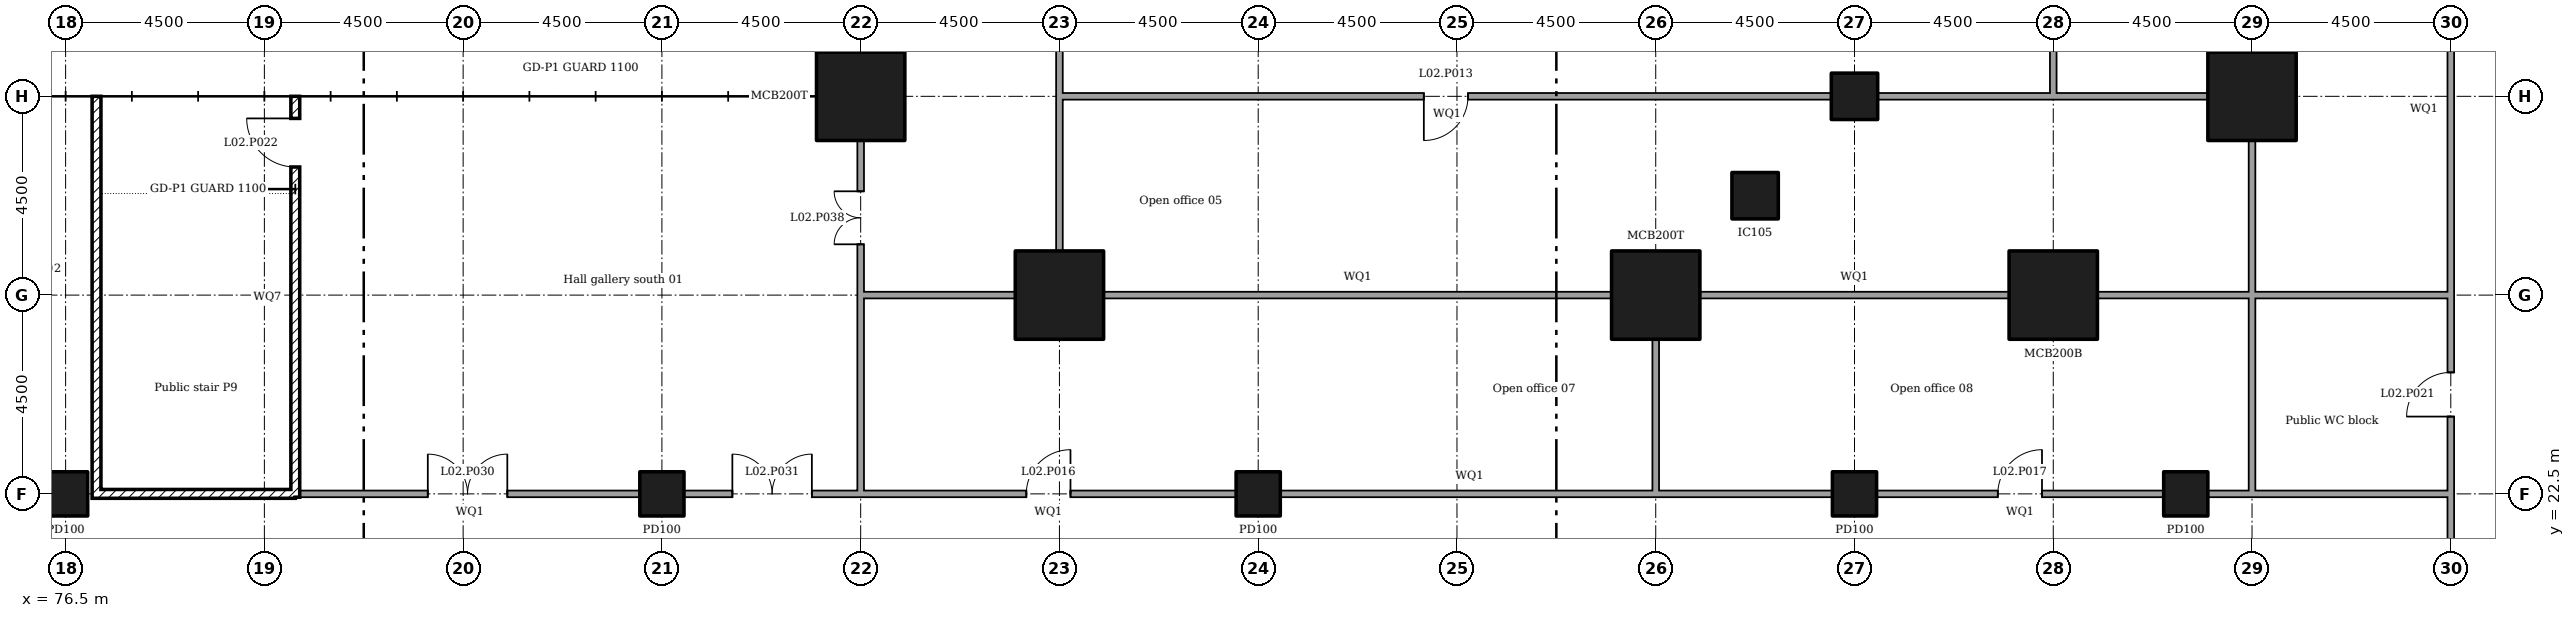
"""IFC4 building model, lengths in metres.
Left out: names, types, materials, properties, quantities, classifications, styles, units other than length and angle.
Written with IfcOpenShell. Run it as: python <this file> out.ifc"""

import sys

from ifc_helpers import new_model, si_unit, direction, frame, frame_2d, origin, origin_2d, place, context, subcontext, project, spatial, rectangle, extrude, element, fill, save


model = new_model("IFC4")
c1 = context("Model", 3, precision=1e-05, world=origin(), true_north=direction((0.0, 1.0)))
c2 = subcontext(c1, "Body", "Model", "MODEL_VIEW")
j1 = project(units=[si_unit("LENGTHUNIT", "METRE"), si_unit("PLANEANGLEUNIT", "RADIAN")], contexts=[c1])
p1 = place(None, origin())
s1 = spatial("IfcSite", under=j1, at=p1, CompositionType="ELEMENT")
p2 = place(p1, origin())
s2 = spatial("IfcBuilding", under=s1, at=p2, CompositionType="ELEMENT")
p3 = place(p2, frame((0.0, 0.0, 11.5)))
s3 = spatial("IfcBuildingStorey", under=s2, at=p3, CompositionType="ELEMENT", Elevation=11.5)
for number, where in (
    (1, (94.5, 31.5, 0.0)),
    (2, (99.0, 27.0, 0.0)),
    (3, (112.5, 27.0, 0.0)),
    (4, (121.5, 27.0, 0.0)),
    (5, (126.0, 31.5, 0.0)),
):
    element("IfcColumn", number, at=place(p3, frame(where)), inside=s3, PredefinedType="COLUMN", context=c2, shape_type="SweptSolid", body=[
        extrude(rectangle(XDim=2.0, YDim=2.0, at=origin_2d()), origin(), (0.0, 0.0, 1.0), 5.0),
    ])
for number, where in (
    (6, (114.75, 29.25, 0.0)),
    (7, (117.0, 31.5, 0.0)),
):
    element("IfcColumn", number, at=place(p3, frame(where)), inside=s3, PredefinedType="COLUMN", context=c2, shape_type="SweptSolid", body=[
        extrude(rectangle(XDim=1.05, YDim=1.05, at=origin_2d()), origin(), (0.0, 0.0, 1.0), 5.0),
    ])
for number, where in (
    (8, (76.5, 22.5, 0.0)),
    (9, (90.0, 22.5, 0.0)),
    (10, (103.5, 22.5, 0.0)),
    (11, (117.0, 22.5, 0.0)),
    (12, (124.5, 22.5, 0.0)),
):
    element("IfcColumn", number, at=place(p3, frame(where)), inside=s3, PredefinedType="COLUMN", context=c2, shape_type="SweptSolid", body=[
        extrude(rectangle(XDim=1.0, YDim=1.0, at=origin_2d()), origin(), (0.0, 0.0, 1.0), 5.0),
    ])
p4 = place(p2, frame((0.0, 0.0, 6.0)))
s4 = spatial("IfcBuildingStorey", under=s2, at=p4, CompositionType="ELEMENT", Elevation=6.0)
p5 = place(p4, frame((94.5, 32.495, 0.0), z_axis=(0.0, 0.0, 1.0), x_axis=(0.0, 1.0, 0.0)))
e13 = element("IfcWall", 13, at=p5, inside=s4, PredefinedType="SOLIDWALL", context=c2, shape_type="SweptSolid", body=[
    extrude(rectangle(XDim=11.51, YDim=0.3, at=frame_2d((5.755, 0.0))), origin(), (0.0, 0.0, 1.0), 10.05),
])
p6 = place(p5, frame((4.85, 0.0, 0.0)))
e14 = element("IfcOpeningElement", 14, at=p6, cuts=e13, PredefinedType="OPENING", context=c2, shape_type="SweptSolid", body=[
    extrude(rectangle(XDim=1.8, YDim=2.1, at=frame_2d((0.9, 1.05))), frame((0.0, 0.16, 0.0), z_axis=(0.0, -1.0, 0.0), x_axis=(1.0, 0.0, 0.0)), (0.0, 0.0, 1.0), 0.32),
])
p7 = place(p3, frame((130.5, 18.3, 0.0), z_axis=(0.0, 0.0, 1.0), x_axis=(0.0, 1.0, 0.0)))
e15 = element("IfcWall", 15, at=p7, inside=s3, PredefinedType="PARTITIONING", context=c2, shape_type="SweptSolid", body=[
    extrude(rectangle(XDim=4.275, YDim=0.15, at=frame_2d((2.137, 0.0))), origin(), (0.0, 0.0, 1.0), 4.55),
])
p8 = place(p7, frame((1.2, 0.0, 0.0)))
e16 = element("IfcOpeningElement", 16, at=p8, cuts=e15, PredefinedType="OPENING", context=c2, shape_type="SweptSolid", body=[
    extrude(rectangle(XDim=1.8, YDim=2.1, at=frame_2d((0.9, 1.05))), frame((0.0, 0.085, 0.0), z_axis=(0.0, -1.0, 0.0), x_axis=(1.0, 0.0, 0.0)), (0.0, 0.0, 1.0), 0.17),
])
p9 = place(p3, frame((130.5, 26.925, 0.0), z_axis=(0.0, 0.0, 1.0), x_axis=(0.0, 1.0, 0.0)))
e17 = element("IfcWall", 17, at=p9, inside=s3, PredefinedType="PARTITIONING", context=c2, shape_type="SweptSolid", body=[
    extrude(rectangle(XDim=8.58, YDim=0.15, at=frame_2d((4.29, 0.0))), origin(), (0.0, 0.0, 1.0), 4.55),
])
p10 = place(p3, frame((130.5, 22.5, 0.0), z_axis=(0.0, 0.0, 1.0), x_axis=(0.0, 1.0, 0.0)))
e18 = element("IfcWall", 18, at=p10, inside=s3, PredefinedType="PARTITIONING", context=c2, shape_type="SweptSolid", body=[
    extrude(rectangle(XDim=4.5, YDim=0.15, at=frame_2d((2.25, 0.0))), origin(), (0.0, 0.0, 1.0), 4.55),
])
p11 = place(p10, frame((1.75, 0.0, 0.0)))
e19 = element("IfcOpeningElement", 19, at=p11, cuts=e18, PredefinedType="OPENING", context=c2, shape_type="SweptSolid", body=[
    extrude(rectangle(XDim=1.0, YDim=2.1, at=frame_2d((0.5, 1.05))), frame((0.0, 0.085, 0.0), z_axis=(0.0, -1.0, 0.0), x_axis=(1.0, 0.0, 0.0)), (0.0, 0.0, 1.0), 0.17),
])
p12 = place(p3, frame((81.8, 22.5, 0.0)))
e20 = element("IfcWall", 20, at=p12, inside=s3, PredefinedType="PARTITIONING", context=c2, shape_type="SweptSolid", body=[
    extrude(rectangle(XDim=7.705, YDim=0.15, at=frame_2d((3.853, 0.0))), origin(), (0.0, 0.0, 1.0), 4.55),
])
p13 = place(p12, frame((2.9, 0.0, 0.0)))
e21 = element("IfcOpeningElement", 21, at=p13, cuts=e20, PredefinedType="OPENING", context=c2, shape_type="SweptSolid", body=[
    extrude(rectangle(XDim=1.8, YDim=2.1, at=frame_2d((0.9, 1.05))), frame((0.0, 0.085, 0.0), z_axis=(0.0, -1.0, 0.0), x_axis=(1.0, 0.0, 0.0)), (0.0, 0.0, 1.0), 0.17),
])
p14 = place(p3, frame((90.495, 22.5, 0.0)))
e22 = element("IfcWall", 22, at=p14, inside=s3, PredefinedType="PARTITIONING", context=c2, shape_type="SweptSolid", body=[
    extrude(rectangle(XDim=4.08, YDim=0.15, at=frame_2d((2.04, 0.0))), origin(), (0.0, 0.0, 1.0), 4.55),
])
p15 = place(p14, frame((1.1, 0.0, 0.0)))
e23 = element("IfcOpeningElement", 23, at=p15, cuts=e22, PredefinedType="OPENING", context=c2, shape_type="SweptSolid", body=[
    extrude(rectangle(XDim=1.8, YDim=2.1, at=frame_2d((0.9, 1.05))), frame((0.0, 0.085, 0.0), z_axis=(0.0, -1.0, 0.0), x_axis=(1.0, 0.0, 0.0)), (0.0, 0.0, 1.0), 0.17),
])
p16 = place(p3, frame((94.5, 22.5, 0.0)))
e24 = element("IfcWall", 24, at=p16, inside=s3, PredefinedType="PARTITIONING", context=c2, shape_type="SweptSolid", body=[
    extrude(rectangle(XDim=8.505, YDim=0.15, at=frame_2d((4.252, 0.0))), origin(), (0.0, 0.0, 1.0), 4.55),
])
p17 = place(p16, frame((3.75, 0.0, 0.0)))
e25 = element("IfcOpeningElement", 25, at=p17, cuts=e24, PredefinedType="OPENING", context=c2, shape_type="SweptSolid", body=[
    extrude(rectangle(XDim=1.0, YDim=2.1, at=frame_2d((0.5, 1.05))), frame((0.0, 0.085, 0.0), z_axis=(0.0, -1.0, 0.0), x_axis=(1.0, 0.0, 0.0)), (0.0, 0.0, 1.0), 0.17),
])
p18 = place(p3, frame((103.995, 22.5, 0.0)))
e26 = element("IfcWall", 26, at=p18, inside=s3, PredefinedType="PARTITIONING", context=c2, shape_type="SweptSolid", body=[
    extrude(rectangle(XDim=8.58, YDim=0.15, at=frame_2d((4.29, 0.0))), origin(), (0.0, 0.0, 1.0), 4.55),
])
p19 = place(p3, frame((112.5, 22.5, 0.0)))
e27 = element("IfcWall", 27, at=p19, inside=s3, PredefinedType="PARTITIONING", context=c2, shape_type="SweptSolid", body=[
    extrude(rectangle(XDim=4.005, YDim=0.15, at=frame_2d((2.002, 0.0))), origin(), (0.0, 0.0, 1.0), 4.55),
])
p20 = place(p3, frame((117.495, 22.5, 0.0)))
e28 = element("IfcWall", 28, at=p20, inside=s3, PredefinedType="PARTITIONING", context=c2, shape_type="SweptSolid", body=[
    extrude(rectangle(XDim=6.51, YDim=0.15, at=frame_2d((3.255, 0.0))), origin(), (0.0, 0.0, 1.0), 4.55),
])
p21 = place(p20, frame((2.75, 0.0, 0.0)))
e29 = element("IfcOpeningElement", 29, at=p21, cuts=e28, PredefinedType="OPENING", context=c2, shape_type="SweptSolid", body=[
    extrude(rectangle(XDim=1.0, YDim=2.1, at=frame_2d((0.5, 1.05))), frame((0.0, 0.085, 0.0), z_axis=(0.0, -1.0, 0.0), x_axis=(1.0, 0.0, 0.0)), (0.0, 0.0, 1.0), 0.17),
])
p22 = place(p3, frame((124.995, 22.5, 0.0)))
e30 = element("IfcWall", 30, at=p22, inside=s3, PredefinedType="PARTITIONING", context=c2, shape_type="SweptSolid", body=[
    extrude(rectangle(XDim=1.08, YDim=0.15, at=frame_2d((0.54, 0.0))), origin(), (0.0, 0.0, 1.0), 4.55),
])
p23 = place(p3, frame((126.0, 22.5, 0.0)))
e31 = element("IfcWall", 31, at=p23, inside=s3, PredefinedType="PARTITIONING", context=c2, shape_type="SweptSolid", body=[
    extrude(rectangle(XDim=4.425, YDim=0.15, at=frame_2d((2.212, 0.0))), origin(), (0.0, 0.0, 1.0), 4.55),
])
p24 = place(p3, frame((77.1, 22.5, 0.0)))
e32 = element("IfcWall", 32, at=p24, inside=s3, PredefinedType="SOLIDWALL", context=c2, shape_type="SweptSolid", body=[
    extrude(rectangle(XDim=4.6, YDim=0.2, at=frame_2d((2.3, 0.0))), origin(), (0.0, 0.0, 1.0), 4.55),
])
p25 = place(p3, frame((94.5, 26.925, 0.0), z_axis=(0.0, 0.0, 1.0), x_axis=(0.0, 1.0, 0.0)))
e33 = element("IfcWall", 33, at=p25, inside=s3, PredefinedType="PARTITIONING", context=c2, shape_type="SweptSolid", body=[
    extrude(rectangle(XDim=3.58, YDim=0.15, at=frame_2d((1.79, 0.0))), origin(), (0.0, 0.0, 1.0), 4.55),
])
p26 = place(p25, frame((1.225, 0.0, 0.0)))
e34 = element("IfcOpeningElement", 34, at=p26, cuts=e33, PredefinedType="OPENING", context=c2, shape_type="SweptSolid", body=[
    extrude(rectangle(XDim=1.2, YDim=2.1, at=frame_2d((0.6, 1.05))), frame((0.0, 0.085, 0.0), z_axis=(0.0, -1.0, 0.0), x_axis=(1.0, 0.0, 0.0)), (0.0, 0.0, 1.0), 0.17),
])
p27 = place(p3, frame((94.5, 22.575, 0.0), z_axis=(0.0, 0.0, 1.0), x_axis=(0.0, 1.0, 0.0)))
e35 = element("IfcWall", 35, at=p27, inside=s3, PredefinedType="PARTITIONING", context=c2, shape_type="SweptSolid", body=[
    extrude(rectangle(XDim=4.425, YDim=0.15, at=frame_2d((2.212, 0.0))), origin(), (0.0, 0.0, 1.0), 4.55),
])
p28 = place(p3, frame((81.7, 22.425, 0.0), z_axis=(0.0, 0.0, 1.0), x_axis=(0.0, 1.0, 0.0)))
e36 = element("IfcWall", 36, at=p28, inside=s3, PredefinedType="SOLIDWALL", context=c2, shape_type="SweptSolid", body=[
    extrude(rectangle(XDim=9.075, YDim=0.2, at=frame_2d((4.538, 0.0))), origin(), (0.0, 0.0, 1.0), 4.55),
])
p29 = place(p28, frame((7.475, 0.0, 0.0)))
e37 = element("IfcOpeningElement", 37, at=p29, cuts=e36, PredefinedType="OPENING", context=c2, shape_type="SweptSolid", body=[
    extrude(rectangle(XDim=1.1, YDim=2.1, at=frame_2d((0.55, 1.05))), frame((0.0, 0.11, 0.0), z_axis=(0.0, -1.0, 0.0), x_axis=(1.0, 0.0, 0.0)), (0.0, 0.0, 1.0), 0.22),
])
p30 = place(p3, frame((99.0, 31.425, 0.0), z_axis=(0.0, 0.0, 1.0), x_axis=(0.0, 1.0, 0.0)))
e38 = element("IfcWall", 38, at=p30, inside=s3, PredefinedType="PARTITIONING", context=c2, shape_type="SweptSolid", body=[
    extrude(rectangle(XDim=4.055, YDim=0.15, at=frame_2d((2.027, 0.0))), origin(), (0.0, 0.0, 1.0), 4.55),
])
p31 = place(p30, frame((1.175, 0.0, 0.0)))
e39 = element("IfcOpeningElement", 39, at=p31, cuts=e38, PredefinedType="OPENING", context=c2, shape_type="SweptSolid", body=[
    extrude(rectangle(XDim=1.8, YDim=2.1, at=frame_2d((0.9, 1.05))), frame((0.0, 0.085, 0.0), z_axis=(0.0, -1.0, 0.0), x_axis=(1.0, 0.0, 0.0)), (0.0, 0.0, 1.0), 0.17),
])
p32 = place(p3, frame((99.0, 27.995, 0.0), z_axis=(0.0, 0.0, 1.0), x_axis=(0.0, 1.0, 0.0)))
e40 = element("IfcWall", 40, at=p32, inside=s3, PredefinedType="PARTITIONING", context=c2, shape_type="SweptSolid", body=[
    extrude(rectangle(XDim=3.505, YDim=0.15, at=frame_2d((1.752, 0.0))), origin(), (0.0, 0.0, 1.0), 4.55),
])
p33 = place(p3, frame((94.575, 27.0, 0.0)))
e41 = element("IfcWall", 41, at=p33, inside=s3, PredefinedType="PARTITIONING", context=c2, shape_type="SweptSolid", body=[
    extrude(rectangle(XDim=3.43, YDim=0.15, at=frame_2d((1.715, 0.0))), origin(), (0.0, 0.0, 1.0), 4.55),
])
p34 = place(p3, frame((99.075, 31.5, 0.0)))
e42 = element("IfcWall", 42, at=p34, inside=s3, PredefinedType="PARTITIONING", context=c2, shape_type="SweptSolid", body=[
    extrude(rectangle(XDim=17.405, YDim=0.15, at=frame_2d((8.703, 0.0))), origin(), (0.0, 0.0, 1.0), 4.55),
])
p35 = place(p34, frame((8.175, 0.0, 0.0)))
e43 = element("IfcOpeningElement", 43, at=p35, cuts=e42, PredefinedType="OPENING", context=c2, shape_type="SweptSolid", body=[
    extrude(rectangle(XDim=1.0, YDim=2.1, at=frame_2d((0.5, 1.05))), frame((0.0, 0.085, 0.0), z_axis=(0.0, -1.0, 0.0), x_axis=(1.0, 0.0, 0.0)), (0.0, 0.0, 1.0), 0.17),
])
p36 = place(p3, frame((117.52, 31.5, 0.0)))
e44 = element("IfcWall", 44, at=p36, inside=s3, PredefinedType="PARTITIONING", context=c2, shape_type="SweptSolid", body=[
    extrude(rectangle(XDim=4.055, YDim=0.15, at=frame_2d((2.027, 0.0))), origin(), (0.0, 0.0, 1.0), 4.55),
])
p37 = place(p3, frame((121.5, 31.575, 0.0), z_axis=(0.0, 0.0, 1.0), x_axis=(0.0, 1.0, 0.0)))
e45 = element("IfcWall", 45, at=p37, inside=s3, PredefinedType="PARTITIONING", context=c2, shape_type="SweptSolid", body=[
    extrude(rectangle(XDim=17.405, YDim=0.15, at=frame_2d((8.703, 0.0))), origin(), (0.0, 0.0, 1.0), 4.55),
])
p38 = place(p37, frame((8.175, 0.0, 0.0)))
e46 = element("IfcOpeningElement", 46, at=p38, cuts=e45, PredefinedType="OPENING", context=c2, shape_type="SweptSolid", body=[
    extrude(rectangle(XDim=1.0, YDim=2.1, at=frame_2d((0.5, 1.05))), frame((0.0, 0.085, 0.0), z_axis=(0.0, -1.0, 0.0), x_axis=(1.0, 0.0, 0.0)), (0.0, 0.0, 1.0), 0.17),
])
p39 = place(p3, frame((121.5, 31.5, 0.0)))
e47 = element("IfcWall", 47, at=p39, inside=s3, PredefinedType="PARTITIONING", context=c2, shape_type="SweptSolid", body=[
    extrude(rectangle(XDim=3.505, YDim=0.15, at=frame_2d((1.752, 0.0))), origin(), (0.0, 0.0, 1.0), 4.55),
])
p40 = place(p3, frame((99.995, 27.0, 0.0)))
e48 = element("IfcWall", 48, at=p40, inside=s3, PredefinedType="PARTITIONING", context=c2, shape_type="SweptSolid", body=[
    extrude(rectangle(XDim=11.51, YDim=0.15, at=frame_2d((5.755, 0.0))), origin(), (0.0, 0.0, 1.0), 4.55),
])
p41 = place(p3, frame((113.495, 27.0, 0.0)))
e49 = element("IfcWall", 49, at=p41, inside=s3, PredefinedType="PARTITIONING", context=c2, shape_type="SweptSolid", body=[
    extrude(rectangle(XDim=7.01, YDim=0.15, at=frame_2d((3.505, 0.0))), origin(), (0.0, 0.0, 1.0), 4.55),
])
p42 = place(p3, frame((122.495, 27.0, 0.0)))
e50 = element("IfcWall", 50, at=p42, inside=s3, PredefinedType="PARTITIONING", context=c2, shape_type="SweptSolid", body=[
    extrude(rectangle(XDim=3.58, YDim=0.15, at=frame_2d((1.79, 0.0))), origin(), (0.0, 0.0, 1.0), 4.55),
])
p43 = place(p3, frame((126.0, 26.925, 0.0), z_axis=(0.0, 0.0, 1.0), x_axis=(0.0, 1.0, 0.0)))
e51 = element("IfcWall", 51, at=p43, inside=s3, PredefinedType="PARTITIONING", context=c2, shape_type="SweptSolid", body=[
    extrude(rectangle(XDim=3.58, YDim=0.15, at=frame_2d((1.79, 0.0))), origin(), (0.0, 0.0, 1.0), 4.55),
])
p44 = place(p3, frame((126.0, 32.495, 0.0), z_axis=(0.0, 0.0, 1.0), x_axis=(0.0, 1.0, 0.0)))
e52 = element("IfcWall", 52, at=p44, inside=s3, PredefinedType="PARTITIONING", context=c2, shape_type="SweptSolid", body=[
    extrude(rectangle(XDim=11.51, YDim=0.15, at=frame_2d((5.755, 0.0))), origin(), (0.0, 0.0, 1.0), 4.55),
])
p45 = place(p3, frame((112.5, 22.575, 0.0), z_axis=(0.0, 0.0, 1.0), x_axis=(0.0, 1.0, 0.0)))
e53 = element("IfcWall", 53, at=p45, inside=s3, PredefinedType="PARTITIONING", context=c2, shape_type="SweptSolid", body=[
    extrude(rectangle(XDim=3.43, YDim=0.15, at=frame_2d((1.715, 0.0))), origin(), (0.0, 0.0, 1.0), 4.55),
])
p46 = place(p3, frame((126.0, 22.575, 0.0), z_axis=(0.0, 0.0, 1.0), x_axis=(0.0, 1.0, 0.0)))
e54 = element("IfcWall", 54, at=p46, inside=s3, PredefinedType="PARTITIONING", context=c2, shape_type="SweptSolid", body=[
    extrude(rectangle(XDim=4.35, YDim=0.15, at=frame_2d((2.175, 0.0))), origin(), (0.0, 0.0, 1.0), 4.55),
])
p47 = place(p3, frame((126.075, 27.0, 0.0)))
e55 = element("IfcWall", 55, at=p47, inside=s3, PredefinedType="PARTITIONING", context=c2, shape_type="SweptSolid", body=[
    extrude(rectangle(XDim=4.35, YDim=0.15, at=frame_2d((2.175, 0.0))), origin(), (0.0, 0.0, 1.0), 4.55),
])
p48 = place(p3, frame((77.2, 22.6, 0.0), z_axis=(0.0, 0.0, 1.0), x_axis=(0.0, 1.0, 0.0)))
e56 = element("IfcWall", 56, at=p48, inside=s3, PredefinedType="SOLIDWALL", context=c2, shape_type="SweptSolid", body=[
    extrude(rectangle(XDim=8.9, YDim=0.2, at=frame_2d((4.45, 0.0))), origin(), (0.0, 0.0, 1.0), 4.55),
])
p49 = place(p35, frame((1.0, 0.0, 0.0), x_axis=(-1.0, 0.0, 0.0)))
e57 = element("IfcDoor", 57, at=p49, inside=s3, OperationType="SINGLE_SWING_LEFT", PredefinedType="DOOR", context=c2, shape_type="SweptSolid", body=[
    extrude(rectangle(XDim=1.0, YDim=2.1, at=frame_2d((0.5, 1.05))), frame((0.0, 0.025, 0.0), z_axis=(0.0, -1.0, 0.0), x_axis=(1.0, 0.0, 0.0)), (0.0, 0.0, 1.0), 0.05),
])
fill(e43, e57)
p50 = place(p17, origin())
e58 = element("IfcDoor", 58, at=p50, inside=s3, OperationType="SINGLE_SWING_LEFT", PredefinedType="DOOR", context=c2, shape_type="SweptSolid", body=[
    extrude(rectangle(XDim=1.0, YDim=2.1, at=frame_2d((0.5, 1.05))), frame((0.0, 0.025, 0.0), z_axis=(0.0, -1.0, 0.0), x_axis=(1.0, 0.0, 0.0)), (0.0, 0.0, 1.0), 0.05),
])
fill(e25, e58)
p51 = place(p21, origin())
e59 = element("IfcDoor", 59, at=p51, inside=s3, OperationType="SINGLE_SWING_LEFT", PredefinedType="DOOR", context=c2, shape_type="SweptSolid", body=[
    extrude(rectangle(XDim=1.0, YDim=2.1, at=frame_2d((0.5, 1.05))), frame((0.0, 0.025, 0.0), z_axis=(0.0, -1.0, 0.0), x_axis=(1.0, 0.0, 0.0)), (0.0, 0.0, 1.0), 0.05),
])
fill(e29, e59)
p52 = place(p11, origin())
e60 = element("IfcDoor", 60, at=p52, inside=s3, OperationType="SINGLE_SWING_RIGHT", PredefinedType="DOOR", context=c2, shape_type="SweptSolid", body=[
    extrude(rectangle(XDim=1.0, YDim=2.1, at=frame_2d((0.5, 1.05))), frame((0.0, 0.025, 0.0), z_axis=(0.0, -1.0, 0.0), x_axis=(1.0, 0.0, 0.0)), (0.0, 0.0, 1.0), 0.05),
])
fill(e19, e60)
p53 = place(p29, origin())
e61 = element("IfcDoor", 61, at=p53, inside=s3, OperationType="SINGLE_SWING_LEFT", PredefinedType="DOOR", context=c2, shape_type="SweptSolid", body=[
    extrude(rectangle(XDim=1.1, YDim=2.1, at=frame_2d((0.55, 1.05))), frame((0.0, 0.025, 0.0), z_axis=(0.0, -1.0, 0.0), x_axis=(1.0, 0.0, 0.0)), (0.0, 0.0, 1.0), 0.05),
])
fill(e37, e61)
p54 = place(p13, origin())
e62 = element("IfcDoor", 62, at=p54, inside=s3, OperationType="DOUBLE_DOOR_SINGLE_SWING", PredefinedType="DOOR", context=c2, shape_type="SweptSolid", body=[
    extrude(rectangle(XDim=1.8, YDim=2.1, at=frame_2d((0.9, 1.05))), frame((0.0, 0.025, 0.0), z_axis=(0.0, -1.0, 0.0), x_axis=(1.0, 0.0, 0.0)), (0.0, 0.0, 1.0), 0.05),
])
fill(e21, e62)
p55 = place(p15, origin())
e63 = element("IfcDoor", 63, at=p55, inside=s3, OperationType="DOUBLE_DOOR_SINGLE_SWING", PredefinedType="DOOR", context=c2, shape_type="SweptSolid", body=[
    extrude(rectangle(XDim=1.8, YDim=2.1, at=frame_2d((0.9, 1.05))), frame((0.0, 0.025, 0.0), z_axis=(0.0, -1.0, 0.0), x_axis=(1.0, 0.0, 0.0)), (0.0, 0.0, 1.0), 0.05),
])
fill(e23, e63)
p56 = place(p26, origin())
e64 = element("IfcDoor", 64, at=p56, inside=s3, OperationType="DOUBLE_DOOR_SINGLE_SWING", PredefinedType="DOOR", context=c2, shape_type="SweptSolid", body=[
    extrude(rectangle(XDim=1.2, YDim=2.1, at=frame_2d((0.6, 1.05))), frame((0.0, 0.025, 0.0), z_axis=(0.0, -1.0, 0.0), x_axis=(1.0, 0.0, 0.0)), (0.0, 0.0, 1.0), 0.05),
])
fill(e34, e64)
save(model, sys.argv[1])
